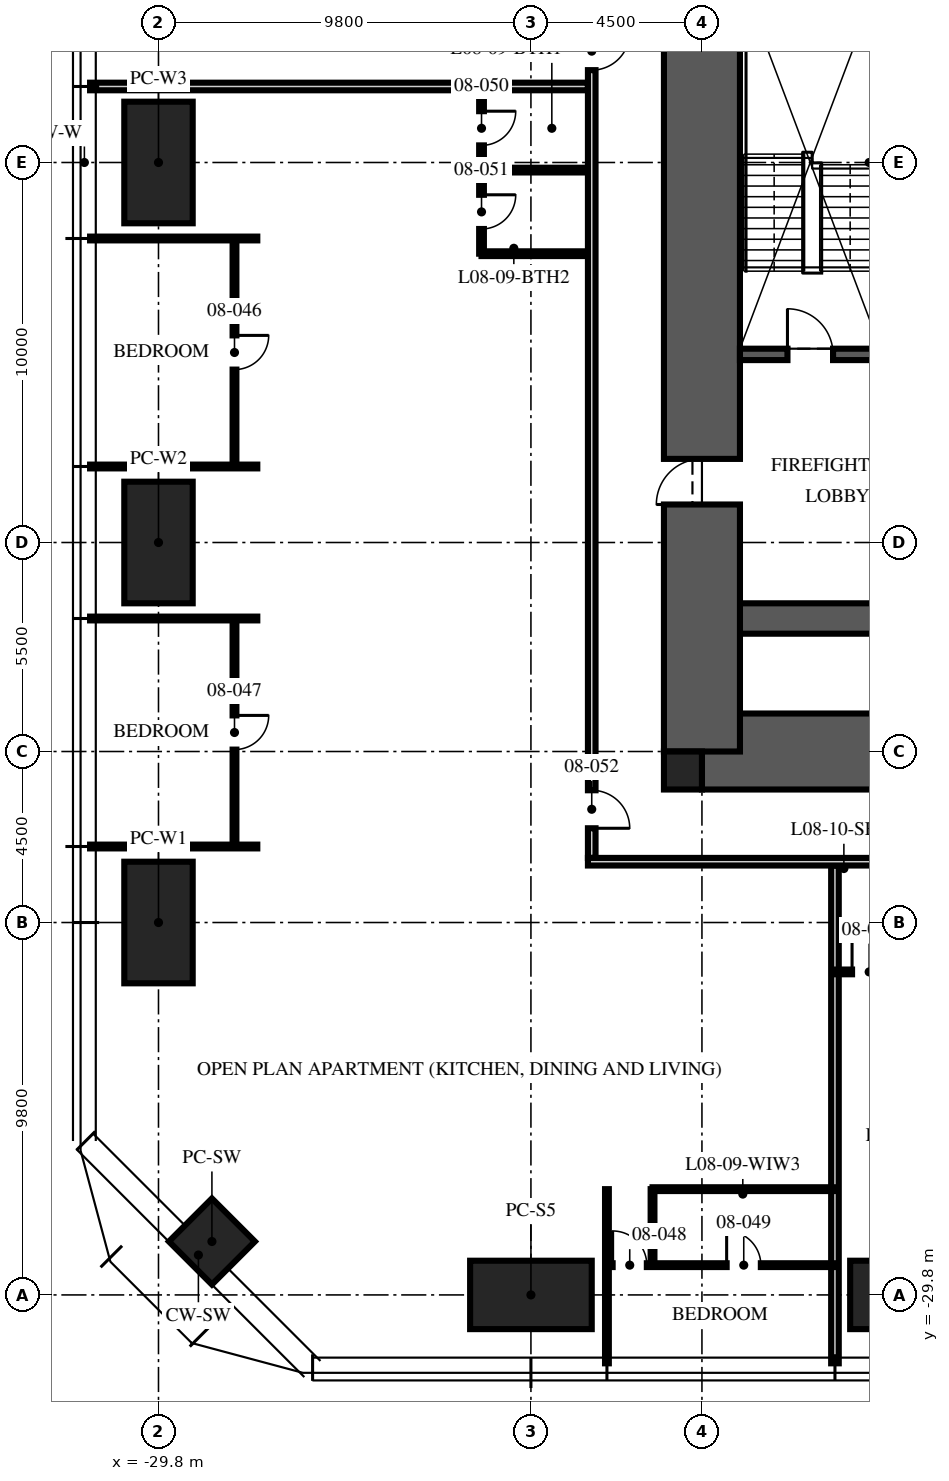
"""IFC4 building model, lengths in metres.
Left out: names, types, materials, properties, quantities, classifications, styles, units other than length and angle.
Written with IfcOpenShell. Run it as: python <this file> out.ifc"""

import sys

from ifc_helpers import new_model, si_unit, direction, frame, frame_2d, origin, origin_2d, place, context, subcontext, project, spatial, rectangle, hollow_rectangle, extrude, element, fill, save


model = new_model("IFC4")
c1 = context("Model", 3, precision=1e-05, world=origin(), true_north=direction((0.0, 1.0)))
c2 = subcontext(c1, "Body", "Model", "MODEL_VIEW")
j1 = project(units=[si_unit("LENGTHUNIT", "METRE"), si_unit("PLANEANGLEUNIT", "RADIAN")], contexts=[c1])
p1 = place(None, origin())
s1 = spatial("IfcSite", under=j1, at=p1, CompositionType="ELEMENT")
p2 = place(p1, origin())
s2 = spatial("IfcBuilding", under=s1, at=p2, CompositionType="ELEMENT")
p3 = place(p2, frame((0.0, 0.0, 36.0)))
s3 = spatial("IfcBuildingStorey", under=s2, at=p3, CompositionType="ELEMENT", Elevation=36.0)
p4 = place(p3, frame((-15.5, -15.5, -0.25), z_axis=(0.0, 0.0, 1.0), x_axis=(1.0, 0.0, 0.0)))
e1 = element("IfcWall", 1, at=p4, inside=s3, PredefinedType="SHEAR", context=c2, shape_type="SweptSolid", body=[
    extrude(rectangle(XDim=31.0, YDim=2.0, at=frame_2d((15.5, 0.0))), origin(), (0.0, 0.0, 1.0), 3.75),
])
p5 = place(p3, frame((-15.5, -12.0, -0.25), z_axis=(0.0, 0.0, 1.0), x_axis=(1.0, 0.0, 0.0)))
e2 = element("IfcWall", 2, at=p5, inside=s3, PredefinedType="SHEAR", context=c2, shape_type="SweptSolid", body=[
    extrude(rectangle(XDim=31.0, YDim=0.8, at=frame_2d((15.5, 0.0))), origin(), (0.0, 0.0, 1.0), 3.75),
])
p6 = place(p3, frame((-15.5, -15.5, -0.25), z_axis=(0.0, 0.0, 1.0), x_axis=(0.0, 1.0, 0.0)))
e3 = element("IfcWall", 3, at=p6, inside=s3, PredefinedType="SHEAR", context=c2, shape_type="SweptSolid", body=[
    extrude(rectangle(XDim=31.0, YDim=2.0, at=frame_2d((15.5, 0.0))), origin(), (0.0, 0.0, 1.0), 3.75),
])
p7 = place(p6, frame((6.5, 0.0, 0.25)))
e4 = element("IfcOpeningElement", 4, at=p7, cuts=e3, PredefinedType="OPENING", context=c2, shape_type="SweptSolid", body=[
    extrude(rectangle(XDim=1.2, YDim=2.1, at=frame_2d((0.6, 1.05))), frame((0.0, 1.01, 0.0), z_axis=(0.0, -1.0, 0.0), x_axis=(1.0, 0.0, 0.0)), (0.0, 0.0, 1.0), 2.02),
])
p8 = place(p6, frame((23.0, 0.0, 0.25)))
e5 = element("IfcOpeningElement", 5, at=p8, cuts=e3, PredefinedType="OPENING", context=c2, shape_type="SweptSolid", body=[
    extrude(rectangle(XDim=1.8, YDim=2.1, at=frame_2d((0.9, 1.05))), frame((0.0, 1.01, 0.0), z_axis=(0.0, -1.0, 0.0), x_axis=(1.0, 0.0, 0.0)), (0.0, 0.0, 1.0), 2.02),
])
p9 = place(p3, frame((-16.0, -16.0, -0.25), z_axis=(0.0, 0.0, 1.0), x_axis=(1.0, 0.0, 0.0)))
e6 = element("IfcColumn", 6, at=p9, inside=s3, PredefinedType="COLUMN", context=c2, shape_type="SweptSolid", body=[
    extrude(rectangle(XDim=1.0, YDim=1.0, at=origin_2d()), origin(), (0.0, 0.0, 1.0), 3.75),
])
for number, where, z_axis, x_axis in (
    (7, (-10.0, -29.8, 0.0), (0.0, 0.0, 1.0), (1.0, 0.0, 0.0)),
    (8, (-20.0, -29.8, 0.0), (0.0, 0.0, 1.0), (1.0, 0.0, 0.0)),
    (9, (-29.8, -20.0, 0.0), (0.0, 0.0, 1.0), (0.0, 1.0, 0.0)),
    (10, (-29.8, -10.0, 0.0), (0.0, 0.0, 1.0), (0.0, 1.0, 0.0)),
    (11, (-29.8, 0.0, 0.0), (0.0, 0.0, 1.0), (0.0, 1.0, 0.0)),
):
    element("IfcColumn", number, at=place(p3, frame(where, z_axis=z_axis, x_axis=x_axis)), inside=s3, PredefinedType="COLUMN", context=c2, shape_type="SweptSolid", body=[
        extrude(hollow_rectangle(XDim=3.2, YDim=1.8, WallThickness=0.2, at=origin_2d()), origin(), (0.0, 0.0, 1.0), 3.75),
    ])
p10 = place(p3, frame((-28.394, -28.394, 0.0), z_axis=(0.0, 0.0, 1.0), x_axis=(0.707106781187, -0.707106781187, 0.0)))
e12 = element("IfcColumn", 12, at=p10, inside=s3, PredefinedType="COLUMN", context=c2, shape_type="SweptSolid", body=[
    extrude(hollow_rectangle(XDim=1.6, YDim=1.6, WallThickness=0.1, at=origin_2d()), origin(), (0.0, 0.0, 1.0), 3.75),
])
p11 = place(p3, frame((-14.5, -5.05, 0.0), z_axis=(0.0, 0.0, 1.0), x_axis=(1.0, 0.0, 0.0)))
e13 = element("IfcWall", 13, at=p11, inside=s3, PredefinedType="SOLIDWALL", context=c2, shape_type="SweptSolid", body=[
    extrude(rectangle(XDim=5.7, YDim=0.3, at=frame_2d((2.85, 0.0))), origin(), (0.0, 0.0, 1.0), 3.5),
])
p12 = place(p11, frame((1.25, 0.0, 0.0)))
e14 = element("IfcOpeningElement", 14, at=p12, cuts=e13, PredefinedType="OPENING", context=c2, shape_type="SweptSolid", body=[
    extrude(rectangle(XDim=1.2, YDim=2.1, at=frame_2d((0.6, 1.05))), frame((0.0, 0.16, 0.0), z_axis=(0.0, -1.0, 0.0), x_axis=(1.0, 0.0, 0.0)), (0.0, 0.0, 1.0), 0.32),
])
p13 = place(p3, frame((-18.5, 2.0, 0.0), z_axis=(0.0, 0.0, 1.0), x_axis=(-1.0, 0.0, 0.0)))
e15 = element("IfcWall", 15, at=p13, inside=s3, PredefinedType="PARTITIONING", context=c2, shape_type="SweptSolid", body=[
    extrude(rectangle(XDim=13.1, YDim=0.2, at=frame_2d((6.55, 0.0))), origin(), (0.0, 0.0, 1.0), 2.71),
])
for number, where, z_axis, x_axis in (
    (16, (-27.2, -2.0, 0.0), (0.0, 0.0, 1.0), (-1.0, 0.0, 0.0)),
    (17, (-27.2, -8.0, 0.0), (0.0, 0.0, 1.0), (-1.0, 0.0, 0.0)),
    (18, (-27.2, -12.0, 0.0), (0.0, 0.0, 1.0), (-1.0, 0.0, 0.0)),
    (19, (-27.2, -18.0, 0.0), (0.0, 0.0, 1.0), (-1.0, 0.0, 0.0)),
):
    element("IfcWall", number, at=place(p3, frame(where, z_axis=z_axis, x_axis=x_axis)), inside=s3, PredefinedType="PARTITIONING", context=c2, shape_type="SweptSolid", body=[
        extrude(rectangle(XDim=4.4, YDim=0.1, at=frame_2d((2.2, 0.0))), origin(), (0.0, 0.0, 1.0), 2.71),
    ])
p14 = place(p3, frame((-18.0, -27.017, 0.0), z_axis=(0.0, 0.0, 1.0), x_axis=(0.0, -1.0, 0.0)))
e20 = element("IfcWall", 20, at=p14, inside=s3, PredefinedType="PARTITIONING", context=c2, shape_type="SweptSolid", body=[
    extrude(rectangle(XDim=4.583, YDim=0.1, at=frame_2d((2.292, 0.0))), origin(), (0.0, 0.0, 1.0), 2.71),
])
p15 = place(p3, frame((-12.0, -18.5, 0.0), z_axis=(0.0, 0.0, 1.0), x_axis=(0.0, -1.0, 0.0)))
e21 = element("IfcWall", 21, at=p15, inside=s3, PredefinedType="PARTITIONING", context=c2, shape_type="SweptSolid", body=[
    extrude(rectangle(XDim=13.1, YDim=0.2, at=frame_2d((6.55, 0.0))), origin(), (0.0, 0.0, 1.0), 2.71),
])
p16 = place(p3, frame((-27.8, -2.0, 0.0), z_axis=(0.0, 0.0, 1.0), x_axis=(0.0, -1.0, 0.0)))
e22 = element("IfcWall", 22, at=p16, inside=s3, PredefinedType="PARTITIONING", context=c2, shape_type="SweptSolid", body=[
    extrude(rectangle(XDim=6.0, YDim=0.1, at=frame_2d((3.0, 0.0))), origin(), (0.0, 0.0, 1.0), 2.61),
])
p17 = place(p16, frame((2.55, 0.0, 0.0)))
e23 = element("IfcOpeningElement", 23, at=p17, cuts=e22, PredefinedType="OPENING", context=c2, shape_type="SweptSolid", body=[
    extrude(rectangle(XDim=0.9, YDim=2.1, at=frame_2d((0.45, 1.05))), frame((0.0, 0.06, 0.0), z_axis=(0.0, -1.0, 0.0), x_axis=(1.0, 0.0, 0.0)), (0.0, 0.0, 1.0), 0.12),
])
p18 = place(p3, frame((-27.8, -12.0, 0.0), z_axis=(0.0, 0.0, 1.0), x_axis=(0.0, -1.0, 0.0)))
e24 = element("IfcWall", 24, at=p18, inside=s3, PredefinedType="PARTITIONING", context=c2, shape_type="SweptSolid", body=[
    extrude(rectangle(XDim=6.0, YDim=0.1, at=frame_2d((3.0, 0.0))), origin(), (0.0, 0.0, 1.0), 2.61),
])
p19 = place(p18, frame((2.55, 0.0, 0.0)))
e25 = element("IfcOpeningElement", 25, at=p19, cuts=e24, PredefinedType="OPENING", context=c2, shape_type="SweptSolid", body=[
    extrude(rectangle(XDim=0.9, YDim=2.1, at=frame_2d((0.45, 1.05))), frame((0.0, 0.06, 0.0), z_axis=(0.0, -1.0, 0.0), x_axis=(1.0, 0.0, 0.0)), (0.0, 0.0, 1.0), 0.12),
])
p20 = place(p3, frame((-18.0, -29.017, 0.0), z_axis=(0.0, 0.0, 1.0), x_axis=(1.0, 0.0, 0.0)))
e26 = element("IfcWall", 26, at=p20, inside=s3, PredefinedType="PARTITIONING", context=c2, shape_type="SweptSolid", body=[
    extrude(rectangle(XDim=6.0, YDim=0.1, at=frame_2d((3.0, 0.0))), origin(), (0.0, 0.0, 1.0), 2.61),
])
p21 = place(p20, frame((0.15, 0.0, 0.0)))
e27 = element("IfcOpeningElement", 27, at=p21, cuts=e26, PredefinedType="OPENING", context=c2, shape_type="SweptSolid", body=[
    extrude(rectangle(XDim=0.9, YDim=2.1, at=frame_2d((0.45, 1.05))), frame((0.0, 0.06, 0.0), z_axis=(0.0, -1.0, 0.0), x_axis=(1.0, 0.0, 0.0)), (0.0, 0.0, 1.0), 0.12),
])
p22 = place(p20, frame((3.15, 0.0, 0.0)))
e28 = element("IfcOpeningElement", 28, at=p22, cuts=e26, PredefinedType="OPENING", context=c2, shape_type="SweptSolid", body=[
    extrude(rectangle(XDim=0.9, YDim=2.1, at=frame_2d((0.45, 1.05))), frame((0.0, 0.06, 0.0), z_axis=(0.0, -1.0, 0.0), x_axis=(1.0, 0.0, 0.0)), (0.0, 0.0, 1.0), 0.12),
])
p23 = place(p3, frame((-16.8, -27.017, 0.0), z_axis=(0.0, 0.0, 1.0), x_axis=(0.0, -1.0, 0.0)))
e29 = element("IfcWall", 29, at=p23, inside=s3, PredefinedType="PARTITIONING", context=c2, shape_type="SweptSolid", body=[
    extrude(rectangle(XDim=2.0, YDim=0.1, at=frame_2d((1.0, 0.0))), origin(), (0.0, 0.0, 1.0), 3.5),
])
p24 = place(p3, frame((-16.8, -27.017, 0.0), z_axis=(0.0, 0.0, 1.0), x_axis=(1.0, 0.0, 0.0)))
e30 = element("IfcWall", 30, at=p24, inside=s3, PredefinedType="PARTITIONING", context=c2, shape_type="SweptSolid", body=[
    extrude(rectangle(XDim=4.8, YDim=0.1, at=frame_2d((2.4, 0.0))), origin(), (0.0, 0.0, 1.0), 2.61),
])
p25 = place(p3, frame((-21.3, 2.0, 0.0), z_axis=(0.0, 0.0, 1.0), x_axis=(0.0, -1.0, 0.0)))
e31 = element("IfcWall", 31, at=p25, inside=s3, PredefinedType="PARTITIONING", context=c2, shape_type="SweptSolid", body=[
    extrude(rectangle(XDim=4.4, YDim=0.125, at=frame_2d((2.2, 0.0))), origin(), (0.0, 0.0, 1.0), 2.492),
])
p26 = place(p25, frame((0.65, 0.0, 0.0)))
e32 = element("IfcOpeningElement", 32, at=p26, cuts=e31, PredefinedType="OPENING", context=c2, shape_type="SweptSolid", body=[
    extrude(rectangle(XDim=0.9, YDim=2.1, at=frame_2d((0.45, 1.05))), frame((0.0, 0.073, 0.0), z_axis=(0.0, -1.0, 0.0), x_axis=(1.0, 0.0, 0.0)), (0.0, 0.0, 1.0), 0.145),
])
p27 = place(p25, frame((2.85, 0.0, 0.0)))
e33 = element("IfcOpeningElement", 33, at=p27, cuts=e31, PredefinedType="OPENING", context=c2, shape_type="SweptSolid", body=[
    extrude(rectangle(XDim=0.9, YDim=2.1, at=frame_2d((0.45, 1.05))), frame((0.0, 0.073, 0.0), z_axis=(0.0, -1.0, 0.0), x_axis=(1.0, 0.0, 0.0)), (0.0, 0.0, 1.0), 0.145),
])
p28 = place(p3, frame((-18.5, -0.2, 0.0), z_axis=(0.0, 0.0, 1.0), x_axis=(-1.0, 0.0, 0.0)))
e34 = element("IfcWall", 34, at=p28, inside=s3, PredefinedType="PARTITIONING", context=c2, shape_type="SweptSolid", body=[
    extrude(rectangle(XDim=2.8, YDim=0.125, at=frame_2d((1.4, 0.0))), origin(), (0.0, 0.0, 1.0), 2.492),
])
p29 = place(p3, frame((-18.5, -2.4, 0.0), z_axis=(0.0, 0.0, 1.0), x_axis=(-1.0, 0.0, 0.0)))
e35 = element("IfcWall", 35, at=p29, inside=s3, PredefinedType="PARTITIONING", context=c2, shape_type="SweptSolid", body=[
    extrude(rectangle(XDim=2.8, YDim=0.125, at=frame_2d((1.4, 0.0))), origin(), (0.0, 0.0, 1.0), 3.5),
])
p30 = place(p3, frame((-12.0, -21.3, 0.0), z_axis=(0.0, 0.0, 1.0), x_axis=(1.0, 0.0, 0.0)))
e36 = element("IfcWall", 36, at=p30, inside=s3, PredefinedType="PARTITIONING", context=c2, shape_type="SweptSolid", body=[
    extrude(rectangle(XDim=1.8, YDim=0.125, at=frame_2d((0.9, 0.0))), origin(), (0.0, 0.0, 1.0), 3.5),
])
p31 = place(p30, frame((0.45, 0.0, 0.0)))
e37 = element("IfcOpeningElement", 37, at=p31, cuts=e36, PredefinedType="OPENING", context=c2, shape_type="SweptSolid", body=[
    extrude(rectangle(XDim=0.9, YDim=2.1, at=frame_2d((0.45, 1.05))), frame((0.0, 0.073, 0.0), z_axis=(0.0, -1.0, 0.0), x_axis=(1.0, 0.0, 0.0)), (0.0, 0.0, 1.0), 0.145),
])
p32 = place(p3, frame((-18.4, 18.3, 0.0), z_axis=(0.0, 0.0, 1.0), x_axis=(0.0, -1.0, 0.0)))
e38 = element("IfcWall", 38, at=p32, inside=s3, PredefinedType="PARTITIONING", context=c2, shape_type="SweptSolid", body=[
    extrude(rectangle(XDim=36.6, YDim=0.2, at=frame_2d((18.3, 0.0))), origin(), (0.0, 0.0, 1.0), 2.3),
])
p33 = place(p32, frame((8.7, 0.0, 0.0)))
e39 = element("IfcOpeningElement", 39, at=p33, cuts=e38, PredefinedType="OPENING", context=c2, shape_type="SweptSolid", body=[
    extrude(rectangle(XDim=1.0, YDim=2.2, at=frame_2d((0.5, 1.1))), frame((0.0, 0.11, 0.0), z_axis=(0.0, -1.0, 0.0), x_axis=(1.0, 0.0, 0.0)), (0.0, 0.0, 1.0), 0.22),
])
p34 = place(p32, frame((14.87, 0.0, 0.0)))
e40 = element("IfcOpeningElement", 40, at=p34, cuts=e38, PredefinedType="OPENING", context=c2, shape_type="SweptSolid", body=[
    extrude(rectangle(XDim=1.0, YDim=2.2, at=frame_2d((0.5, 1.1))), frame((0.0, 0.11, 0.0), z_axis=(0.0, -1.0, 0.0), x_axis=(1.0, 0.0, 0.0)), (0.0, 0.0, 1.0), 0.22),
])
p35 = place(p32, frame((34.82, 0.0, 0.0)))
e41 = element("IfcOpeningElement", 41, at=p35, cuts=e38, PredefinedType="OPENING", context=c2, shape_type="SweptSolid", body=[
    extrude(rectangle(XDim=1.0, YDim=2.2, at=frame_2d((0.5, 1.1))), frame((0.0, 0.11, 0.0), z_axis=(0.0, -1.0, 0.0), x_axis=(1.0, 0.0, 0.0)), (0.0, 0.0, 1.0), 0.22),
])
p36 = place(p3, frame((18.5, -18.4, 0.0), z_axis=(0.0, 0.0, 1.0), x_axis=(-1.0, 0.0, 0.0)))
e42 = element("IfcWall", 42, at=p36, inside=s3, PredefinedType="PARTITIONING", context=c2, shape_type="SweptSolid", body=[
    extrude(rectangle(XDim=37.0, YDim=0.2, at=frame_2d((18.5, 0.0))), origin(), (0.0, 0.0, 1.0), 2.3),
])
p37 = place(p36, frame((26.93, 0.0, 0.0)))
e43 = element("IfcOpeningElement", 43, at=p37, cuts=e42, PredefinedType="OPENING", context=c2, shape_type="SweptSolid", body=[
    extrude(rectangle(XDim=1.0, YDim=2.2, at=frame_2d((0.5, 1.1))), frame((0.0, 0.11, 0.0), z_axis=(0.0, -1.0, 0.0), x_axis=(1.0, 0.0, 0.0)), (0.0, 0.0, 1.0), 0.22),
])
p38 = place(p36, frame((0.98, 0.0, 0.0)))
e44 = element("IfcOpeningElement", 44, at=p38, cuts=e42, PredefinedType="OPENING", context=c2, shape_type="SweptSolid", body=[
    extrude(rectangle(XDim=1.0, YDim=2.2, at=frame_2d((0.5, 1.1))), frame((0.0, 0.11, 0.0), z_axis=(0.0, -1.0, 0.0), x_axis=(1.0, 0.0, 0.0)), (0.0, 0.0, 1.0), 0.22),
])
p39 = place(p12, origin())
e45 = element("IfcDoor", 45, at=p39, inside=s3, OperationType="SINGLE_SWING_LEFT", PredefinedType="DOOR", context=c2, shape_type="SweptSolid", body=[
    extrude(rectangle(XDim=1.2, YDim=2.1, at=frame_2d((0.6, 1.05))), frame((0.0, 0.025, 0.0), z_axis=(0.0, -1.0, 0.0), x_axis=(1.0, 0.0, 0.0)), (0.0, 0.0, 1.0), 0.05),
])
fill(e14, e45)
p40 = place(p7, origin())
e46 = element("IfcDoor", 46, at=p40, inside=s3, OperationType="SINGLE_SWING_LEFT", PredefinedType="DOOR", context=c2, shape_type="SweptSolid", body=[
    extrude(rectangle(XDim=1.2, YDim=2.1, at=frame_2d((0.6, 1.05))), frame((0.0, 0.025, 0.0), z_axis=(0.0, -1.0, 0.0), x_axis=(1.0, 0.0, 0.0)), (0.0, 0.0, 1.0), 0.05),
])
fill(e4, e46)
p41 = place(p34, origin())
e47 = element("IfcDoor", 47, at=p41, inside=s3, OperationType="SINGLE_SWING_LEFT", PredefinedType="DOOR", context=c2, shape_type="SweptSolid", body=[
    extrude(rectangle(XDim=1.0, YDim=2.2, at=frame_2d((0.5, 1.1))), frame((0.0, 0.025, 0.0), z_axis=(0.0, -1.0, 0.0), x_axis=(1.0, 0.0, 0.0)), (0.0, 0.0, 1.0), 0.05),
])
fill(e40, e47)
p42 = place(p17, origin())
e48 = element("IfcDoor", 48, at=p42, inside=s3, OperationType="SINGLE_SWING_LEFT", PredefinedType="DOOR", context=c2, shape_type="SweptSolid", body=[
    extrude(rectangle(XDim=0.9, YDim=2.1, at=frame_2d((0.45, 1.05))), frame((0.0, 0.025, 0.0), z_axis=(0.0, -1.0, 0.0), x_axis=(1.0, 0.0, 0.0)), (0.0, 0.0, 1.0), 0.05),
])
fill(e23, e48)
p43 = place(p19, origin())
e49 = element("IfcDoor", 49, at=p43, inside=s3, OperationType="SINGLE_SWING_LEFT", PredefinedType="DOOR", context=c2, shape_type="SweptSolid", body=[
    extrude(rectangle(XDim=0.9, YDim=2.1, at=frame_2d((0.45, 1.05))), frame((0.0, 0.025, 0.0), z_axis=(0.0, -1.0, 0.0), x_axis=(1.0, 0.0, 0.0)), (0.0, 0.0, 1.0), 0.05),
])
fill(e25, e49)
p44 = place(p21, origin())
e50 = element("IfcDoor", 50, at=p44, inside=s3, OperationType="SINGLE_SWING_LEFT", PredefinedType="DOOR", context=c2, shape_type="SweptSolid", body=[
    extrude(rectangle(XDim=0.9, YDim=2.1, at=frame_2d((0.45, 1.05))), frame((0.0, 0.025, 0.0), z_axis=(0.0, -1.0, 0.0), x_axis=(1.0, 0.0, 0.0)), (0.0, 0.0, 1.0), 0.05),
])
fill(e27, e50)
p45 = place(p22, origin())
e51 = element("IfcDoor", 51, at=p45, inside=s3, OperationType="SINGLE_SWING_LEFT", PredefinedType="DOOR", context=c2, shape_type="SweptSolid", body=[
    extrude(rectangle(XDim=0.9, YDim=2.1, at=frame_2d((0.45, 1.05))), frame((0.0, 0.025, 0.0), z_axis=(0.0, -1.0, 0.0), x_axis=(1.0, 0.0, 0.0)), (0.0, 0.0, 1.0), 0.05),
])
fill(e28, e51)
p46 = place(p26, origin())
e52 = element("IfcDoor", 52, at=p46, inside=s3, OperationType="SINGLE_SWING_LEFT", PredefinedType="DOOR", context=c2, shape_type="SweptSolid", body=[
    extrude(rectangle(XDim=0.9, YDim=2.1, at=frame_2d((0.45, 1.05))), frame((0.0, 0.025, 0.0), z_axis=(0.0, -1.0, 0.0), x_axis=(1.0, 0.0, 0.0)), (0.0, 0.0, 1.0), 0.05),
])
fill(e32, e52)
p47 = place(p27, origin())
e53 = element("IfcDoor", 53, at=p47, inside=s3, OperationType="SINGLE_SWING_LEFT", PredefinedType="DOOR", context=c2, shape_type="SweptSolid", body=[
    extrude(rectangle(XDim=0.9, YDim=2.1, at=frame_2d((0.45, 1.05))), frame((0.0, 0.025, 0.0), z_axis=(0.0, -1.0, 0.0), x_axis=(1.0, 0.0, 0.0)), (0.0, 0.0, 1.0), 0.05),
])
fill(e33, e53)
p48 = place(p35, origin())
e54 = element("IfcDoor", 54, at=p48, inside=s3, OperationType="SINGLE_SWING_RIGHT", PredefinedType="DOOR", context=c2, shape_type="SweptSolid", body=[
    extrude(rectangle(XDim=1.0, YDim=2.2, at=frame_2d((0.5, 1.1))), frame((0.0, 0.025, 0.0), z_axis=(0.0, -1.0, 0.0), x_axis=(1.0, 0.0, 0.0)), (0.0, 0.0, 1.0), 0.05),
])
fill(e41, e54)
p49 = place(p31, origin())
e55 = element("IfcDoor", 55, at=p49, inside=s3, OperationType="SINGLE_SWING_LEFT", PredefinedType="DOOR", context=c2, shape_type="SweptSolid", body=[
    extrude(rectangle(XDim=0.9, YDim=2.1, at=frame_2d((0.45, 1.05))), frame((0.0, 0.025, 0.0), z_axis=(0.0, -1.0, 0.0), x_axis=(1.0, 0.0, 0.0)), (0.0, 0.0, 1.0), 0.05),
])
fill(e37, e55)
save(model, sys.argv[1])
